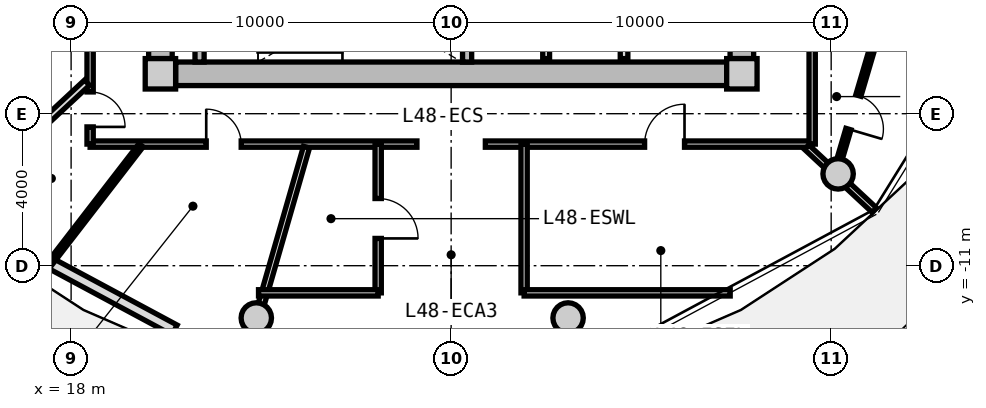
"""IFC4 building model, lengths in metres.
Left out: names, types, materials, properties, quantities, classifications, styles, units other than length and angle.
Written with IfcOpenShell. Run it as: python <this file> out.ifc"""

import sys

from ifc_helpers import new_model, si_unit, direction, frame, frame_2d, origin, origin_2d, place, context, subcontext, project, spatial, rectangle, circle, extrude, source, transform, mapped, element, fill, save


model = new_model("IFC4")
c1 = context("Model", 3, precision=1e-05, world=origin(), true_north=direction((0.0, 1.0)))
c2 = subcontext(c1, "Body", "Model", "MODEL_VIEW")
j1 = project(units=[si_unit("LENGTHUNIT", "METRE"), si_unit("PLANEANGLEUNIT", "RADIAN")], contexts=[c1])
p1 = place(None, origin())
s1 = spatial("IfcSite", under=j1, at=p1, CompositionType="ELEMENT")
p2 = place(p1, origin())
s2 = spatial("IfcBuilding", under=s1, at=p2, CompositionType="ELEMENT")
p3 = place(p2, frame((0.0, 0.0, 155.65)))
s3 = spatial("IfcBuildingStorey", under=s2, at=p3, CompositionType="ELEMENT", Elevation=155.65)
m1 = source(origin(), c2, "Body", "SweptSolid", [
    extrude(rectangle(XDim=0.8, YDim=0.8, at=origin_2d()), origin(), (0.0, 0.0, 1.0), 3.05),
])
for number, where, z_axis, x_axis in (
    (1, (20.35, -5.95, 0.0), (0.0, 0.0, 1.0), (1.0, 0.0, 0.0)),
    (2, (35.65, -5.95, 0.0), (0.0, 0.0, 1.0), (1.0, 0.0, 0.0)),
):
    element("IfcColumn", number, at=place(p3, frame(where, z_axis=z_axis, x_axis=x_axis)), inside=s3, PredefinedType="COLUMN", context=c2, shape_type="MappedRepresentation", body=[
        mapped(m1, transform((0.0, 0.0, 0.0), x_axis=(1.0, 0.0, 0.0), y_axis=(0.0, 1.0, 0.0), z_axis=(0.0, 0.0, 1.0), scale=1.0)),
    ])
m2 = source(origin(), c2, "Body", "SweptSolid", [
    extrude(rectangle(XDim=14.5, YDim=0.62, at=frame_2d((7.25, 0.0))), origin(), (0.0, 0.0, 1.0), 2.81),
])
p4 = place(p3, frame((35.25, -5.95, 0.0), z_axis=(0.0, 0.0, 1.0), x_axis=(-1.0, 0.0, 0.0)))
e3 = element("IfcWall", 3, at=p4, inside=s3, PredefinedType="SHEAR", context=c2, shape_type="MappedRepresentation", body=[
    mapped(m2, transform((0.0, 0.0, 0.0), x_axis=(1.0, 0.0, 0.0), y_axis=(0.0, 1.0, 0.0), z_axis=(0.0, 0.0, 1.0), scale=1.0)),
])
m3 = source(origin(), c2, "Body", "SweptSolid", [
    extrude(rectangle(XDim=11.1, YDim=0.62, at=frame_2d((5.55, 0.0))), origin(), (0.0, 0.0, 1.0), 2.81),
])
p5 = place(p3, frame((20.35, -5.55, 0.0), z_axis=(0.0, 0.0, 1.0), x_axis=(0.0, 1.0, 0.0)))
e4 = element("IfcWall", 4, at=p5, inside=s3, PredefinedType="SHEAR", context=c2, shape_type="MappedRepresentation", body=[
    mapped(m3, transform((0.0, 0.0, 0.0), x_axis=(1.0, 0.0, 0.0), y_axis=(0.0, 1.0, 0.0), z_axis=(0.0, 0.0, 1.0), scale=1.0)),
])
p6 = place(p5, frame((3.8, 0.0, 0.0)))
e5 = element("IfcOpeningElement", 5, at=p6, cuts=e4, PredefinedType="OPENING", context=c2, shape_type="SweptSolid", body=[
    extrude(rectangle(XDim=1.2, YDim=2.15, at=frame_2d((0.6, 1.075))), frame((0.0, 0.32, 0.0), z_axis=(0.0, -1.0, 0.0), x_axis=(1.0, 0.0, 0.0)), (0.0, 0.0, 1.0), 0.64),
])
p7 = place(p3, frame((35.65, 5.55, 0.0), z_axis=(0.0, 0.0, 1.0), x_axis=(0.0, -1.0, 0.0)))
e6 = element("IfcWall", 6, at=p7, inside=s3, PredefinedType="SHEAR", context=c2, shape_type="MappedRepresentation", body=[
    mapped(m3, transform((0.0, 0.0, 0.0), x_axis=(1.0, 0.0, 0.0), y_axis=(0.0, 1.0, 0.0), z_axis=(0.0, 0.0, 1.0), scale=1.0)),
])
p8 = place(p7, frame((5.65, 0.0, 0.0)))
e7 = element("IfcOpeningElement", 7, at=p8, cuts=e6, PredefinedType="OPENING", context=c2, shape_type="SweptSolid", body=[
    extrude(rectangle(XDim=1.2, YDim=2.15, at=frame_2d((0.6, 1.075))), frame((0.0, 0.32, 0.0), z_axis=(0.0, -1.0, 0.0), x_axis=(1.0, 0.0, 0.0)), (0.0, 0.0, 1.0), 0.64),
])
m4 = source(origin(), c2, "Body", "SweptSolid", [
    extrude(circle(Radius=0.4, at=origin_2d()), origin(), (0.0, 0.0, 1.0), 3.05),
])
for number, where, z_axis, x_axis in (
    (8, (22.873, -12.375, 0.0), (0.0, 0.0, 1.0), (1.0, 0.0, 0.0)),
    (9, (31.077, -12.375, 0.0), (0.0, 0.0, 1.0), (1.0, 0.0, 0.0)),
    (10, (38.183, -8.584, 0.0), (0.0, 0.0, 1.0), (1.0, 0.0, 0.0)),
):
    element("IfcColumn", number, at=place(p3, frame(where, z_axis=z_axis, x_axis=x_axis)), inside=s3, PredefinedType="COLUMN", context=c2, shape_type="MappedRepresentation", body=[
        mapped(m4, transform((0.0, 0.0, 0.0), x_axis=(1.0, 0.0, 0.0), y_axis=(0.0, 1.0, 0.0), z_axis=(0.0, 0.0, 1.0), scale=1.0)),
    ])
m5 = source(origin(), c2, "Body", "SweptSolid", [
    extrude(rectangle(XDim=8.742, YDim=0.29, at=frame_2d((4.371, 0.0))), origin(), (0.0, 0.0, 1.0), 2.81),
])
p9 = place(p3, frame((22.529, -13.66, 0.0), z_axis=(0.0, 0.0, 1.0), x_axis=(-0.880998740657, 0.473118609823, 0.0)))
e11 = element("IfcWall", 11, at=p9, inside=s3, PredefinedType="SOLIDWALL", context=c2, shape_type="MappedRepresentation", body=[
    mapped(m5, transform((0.0, 0.0, 0.0), x_axis=(1.0, 0.0, 0.0), y_axis=(0.0, 1.0, 0.0), z_axis=(0.0, 0.0, 1.0), scale=1.0)),
])
p10 = place(p9, frame((0.9, 0.0, 0.0)))
e12 = element("IfcOpeningElement", 12, at=p10, cuts=e11, PredefinedType="OPENING", context=c2, shape_type="SweptSolid", body=[
    extrude(rectangle(XDim=1.15, YDim=2.25, at=frame_2d((0.575, 1.125))), frame((0.0, 0.155, 0.0), z_axis=(0.0, -1.0, 0.0), x_axis=(1.0, 0.0, 0.0)), (0.0, 0.0, 1.0), 0.31),
])
p11 = place(p9, frame((6.161, 0.0, 0.85)))
e13 = element("IfcOpeningElement", 13, at=p11, cuts=e11, PredefinedType="OPENING", context=c2, shape_type="SweptSolid", body=[
    extrude(rectangle(XDim=1.2, YDim=1.5, at=frame_2d((0.6, 0.75))), frame((0.0, 0.155, 0.0), z_axis=(0.0, -1.0, 0.0), x_axis=(1.0, 0.0, 0.0)), (0.0, 0.0, 1.0), 0.31),
])
m6 = source(origin(), c2, "Body", "SweptSolid", [
    extrude(rectangle(XDim=3.19, YDim=0.24, at=frame_2d((1.595, 0.0))), origin(), (0.0, 0.0, 1.0), 2.81),
])
for number, where, z_axis, x_axis in (
    (14, (21.38, -5.64, 0.0), (0.0, 0.0, 1.0), (0.0, 1.0, 0.0)),
    (15, (28.42, -5.64, 0.0), (0.0, 0.0, 1.0), (0.0, 1.0, 0.0)),
):
    element("IfcWall", number, at=place(p3, frame(where, z_axis=z_axis, x_axis=x_axis)), inside=s3, PredefinedType="PARTITIONING", context=c2, shape_type="MappedRepresentation", body=[
        mapped(m6, transform((0.0, 0.0, 0.0), x_axis=(1.0, 0.0, 0.0), y_axis=(0.0, 1.0, 0.0), z_axis=(0.0, 0.0, 1.0), scale=1.0)),
    ])
m7 = source(origin(), c2, "Body", "SweptSolid", [
    extrude(rectangle(XDim=3.8, YDim=0.2, at=frame_2d((1.9, 0.0))), origin(), (0.0, 0.0, 1.0), 2.795),
])
p12 = place(p3, frame((32.55, -5.55, 0.0), z_axis=(0.0, 0.0, 1.0), x_axis=(0.0, 1.0, 0.0)))
e16 = element("IfcWall", 16, at=p12, inside=s3, PredefinedType="PARTITIONING", context=c2, shape_type="MappedRepresentation", body=[
    mapped(m7, transform((0.0, 0.0, 0.0), x_axis=(1.0, 0.0, 0.0), y_axis=(0.0, 1.0, 0.0), z_axis=(0.0, 0.0, 1.0), scale=1.0)),
])
m8 = source(origin(), c2, "Body", "SweptSolid", [
    extrude(rectangle(XDim=3.22, YDim=0.18, at=frame_2d((1.61, 0.0))), origin(), (0.0, 0.0, 1.0), 2.795),
])
p13 = place(p3, frame((30.5, -5.55, 0.0), z_axis=(0.0, 0.0, 1.0), x_axis=(0.0, 1.0, 0.0)))
e17 = element("IfcWall", 17, at=p13, inside=s3, PredefinedType="PARTITIONING", context=c2, shape_type="MappedRepresentation", body=[
    mapped(m8, transform((0.0, 0.0, 0.0), x_axis=(1.0, 0.0, 0.0), y_axis=(0.0, 1.0, 0.0), z_axis=(0.0, 0.0, 1.0), scale=1.0)),
])
m9 = source(origin(), c2, "Body", "SweptSolid", [
    extrude(rectangle(XDim=8.6, YDim=0.165, at=frame_2d((4.3, 0.0))), origin(), (0.0, 0.0, 1.0), 2.795),
])
p14 = place(p3, frame((37.5, -7.8, 0.0), z_axis=(0.0, 0.0, 1.0), x_axis=(-1.0, 0.0, 0.0)))
e18 = element("IfcWall", 18, at=p14, inside=s3, PredefinedType="PARTITIONING", context=c2, shape_type="MappedRepresentation", body=[
    mapped(m9, transform((0.0, 0.0, 0.0), x_axis=(1.0, 0.0, 0.0), y_axis=(0.0, 1.0, 0.0), z_axis=(0.0, 0.0, 1.0), scale=1.0)),
])
p15 = place(p14, frame((3.359, 0.0, 0.0)))
e19 = element("IfcOpeningElement", 19, at=p15, cuts=e18, PredefinedType="OPENING", context=c2, shape_type="SweptSolid", body=[
    extrude(rectangle(XDim=1.05, YDim=2.15, at=frame_2d((0.525, 1.075))), frame((0.0, 0.093, 0.0), z_axis=(0.0, -1.0, 0.0), x_axis=(1.0, 0.0, 0.0)), (0.0, 0.0, 1.0), 0.185),
])
p16 = place(p3, frame((27.1, -7.8, 0.0), z_axis=(0.0, 0.0, 1.0), x_axis=(-1.0, 0.0, 0.0)))
e20 = element("IfcWall", 20, at=p16, inside=s3, PredefinedType="PARTITIONING", context=c2, shape_type="MappedRepresentation", body=[
    mapped(m9, transform((0.0, 0.0, 0.0), x_axis=(1.0, 0.0, 0.0), y_axis=(0.0, 1.0, 0.0), z_axis=(0.0, 0.0, 1.0), scale=1.0)),
])
p17 = place(p16, frame((4.625, 0.0, 0.0)))
e21 = element("IfcOpeningElement", 21, at=p17, cuts=e20, PredefinedType="OPENING", context=c2, shape_type="SweptSolid", body=[
    extrude(rectangle(XDim=0.92, YDim=2.1, at=frame_2d((0.46, 1.05))), frame((0.0, 0.093, 0.0), z_axis=(0.0, -1.0, 0.0), x_axis=(1.0, 0.0, 0.0)), (0.0, 0.0, 1.0), 0.185),
])
m10 = source(origin(), c2, "Body", "SweptSolid", [
    extrude(rectangle(XDim=15.6, YDim=0.165, at=frame_2d((7.8, 0.0))), origin(), (0.0, 0.0, 1.0), 2.795),
])
p18 = place(p3, frame((18.5, -7.8, 0.0), z_axis=(0.0, 0.0, 1.0), x_axis=(0.0, 1.0, 0.0)))
e22 = element("IfcWall", 22, at=p18, inside=s3, PredefinedType="PARTITIONING", context=c2, shape_type="MappedRepresentation", body=[
    mapped(m10, transform((0.0, 0.0, 0.0), x_axis=(1.0, 0.0, 0.0), y_axis=(0.0, 1.0, 0.0), z_axis=(0.0, 0.0, 1.0), scale=1.0)),
])
p19 = place(p18, frame((12.591, 0.0, 0.0)))
e23 = element("IfcOpeningElement", 23, at=p19, cuts=e22, PredefinedType="OPENING", context=c2, shape_type="SweptSolid", body=[
    extrude(rectangle(XDim=1.05, YDim=2.15, at=frame_2d((0.525, 1.075))), frame((0.0, 0.093, 0.0), z_axis=(0.0, -1.0, 0.0), x_axis=(1.0, 0.0, 0.0)), (0.0, 0.0, 1.0), 0.185),
])
p20 = place(p18, frame((8.081, 0.0, 0.0)))
e24 = element("IfcOpeningElement", 24, at=p20, cuts=e22, PredefinedType="OPENING", context=c2, shape_type="SweptSolid", body=[
    extrude(rectangle(XDim=1.05, YDim=2.15, at=frame_2d((0.525, 1.075))), frame((0.0, 0.093, 0.0), z_axis=(0.0, -1.0, 0.0), x_axis=(1.0, 0.0, 0.0)), (0.0, 0.0, 1.0), 0.185),
])
p21 = place(p18, frame((2.854, 0.0, 0.0)))
e25 = element("IfcOpeningElement", 25, at=p21, cuts=e22, PredefinedType="OPENING", context=c2, shape_type="SweptSolid", body=[
    extrude(rectangle(XDim=1.05, YDim=2.15, at=frame_2d((0.525, 1.075))), frame((0.0, 0.093, 0.0), z_axis=(0.0, -1.0, 0.0), x_axis=(1.0, 0.0, 0.0)), (0.0, 0.0, 1.0), 0.185),
])
p22 = place(p18, frame((0.452, 0.0, 0.0)))
e26 = element("IfcOpeningElement", 26, at=p22, cuts=e22, PredefinedType="OPENING", context=c2, shape_type="SweptSolid", body=[
    extrude(rectangle(XDim=0.92, YDim=2.1, at=frame_2d((0.46, 1.05))), frame((0.0, 0.093, 0.0), z_axis=(0.0, -1.0, 0.0), x_axis=(1.0, 0.0, 0.0)), (0.0, 0.0, 1.0), 0.185),
])
p23 = place(p3, frame((37.5, 7.8, 0.0), z_axis=(0.0, 0.0, 1.0), x_axis=(0.0, -1.0, 0.0)))
e27 = element("IfcWall", 27, at=p23, inside=s3, PredefinedType="PARTITIONING", context=c2, shape_type="MappedRepresentation", body=[
    mapped(m10, transform((0.0, 0.0, 0.0), x_axis=(1.0, 0.0, 0.0), y_axis=(0.0, 1.0, 0.0), z_axis=(0.0, 0.0, 1.0), scale=1.0)),
])
p24 = place(p23, frame((9.896, 0.0, 0.0)))
e28 = element("IfcOpeningElement", 28, at=p24, cuts=e27, PredefinedType="OPENING", context=c2, shape_type="SweptSolid", body=[
    extrude(rectangle(XDim=1.05, YDim=2.15, at=frame_2d((0.525, 1.075))), frame((0.0, 0.093, 0.0), z_axis=(0.0, -1.0, 0.0), x_axis=(1.0, 0.0, 0.0)), (0.0, 0.0, 1.0), 0.185),
])
p25 = place(p23, frame((4.306, 0.0, 0.0)))
e29 = element("IfcOpeningElement", 29, at=p25, cuts=e27, PredefinedType="OPENING", context=c2, shape_type="SweptSolid", body=[
    extrude(rectangle(XDim=1.05, YDim=2.15, at=frame_2d((0.525, 1.075))), frame((0.0, 0.093, 0.0), z_axis=(0.0, -1.0, 0.0), x_axis=(1.0, 0.0, 0.0)), (0.0, 0.0, 1.0), 0.185),
])
m11 = source(origin(), c2, "Body", "SweptSolid", [
    extrude(rectangle(XDim=6.035, YDim=0.165, at=frame_2d((3.018, 0.0))), origin(), (0.0, 0.0, 1.0), 2.345),
])
p26 = place(p3, frame((24.194, -7.88, 0.0), z_axis=(0.0, 0.0, 1.0), x_axis=(-0.276809454862, -0.960924828329, 0.0)))
e30 = element("IfcWall", 30, at=p26, inside=s3, PredefinedType="PARTITIONING", context=c2, shape_type="MappedRepresentation", body=[
    mapped(m11, transform((0.0, 0.0, 0.0), x_axis=(1.0, 0.0, 0.0), y_axis=(0.0, 1.0, 0.0), z_axis=(0.0, 0.0, 1.0), scale=1.0)),
])
m12 = source(origin(), c2, "Body", "SweptSolid", [
    extrude(rectangle(XDim=2.435, YDim=0.165, at=frame_2d((1.217, 0.0))), origin(), (0.0, 0.0, 1.0), 2.345),
])
p27 = place(p3, frame((37.354, -7.88, 0.0), z_axis=(0.0, 0.0, 1.0), x_axis=(0.732164643118, -0.681127693878, 0.0)))
e31 = element("IfcWall", 31, at=p27, inside=s3, PredefinedType="PARTITIONING", context=c2, shape_type="MappedRepresentation", body=[
    mapped(m12, transform((0.0, 0.0, 0.0), x_axis=(1.0, 0.0, 0.0), y_axis=(0.0, 1.0, 0.0), z_axis=(0.0, 0.0, 1.0), scale=1.0)),
])
m13 = source(origin(), c2, "Body", "SweptSolid", [
    extrude(rectangle(XDim=3.915, YDim=0.165, at=frame_2d((1.957, 0.0))), origin(), (0.0, 0.0, 1.0), 2.795),
])
p28 = place(p3, frame((26.08, -11.715, 0.0), z_axis=(0.0, 0.0, 1.0), x_axis=(0.0, 1.0, 0.0)))
e32 = element("IfcWall", 32, at=p28, inside=s3, PredefinedType="PARTITIONING", context=c2, shape_type="MappedRepresentation", body=[
    mapped(m13, transform((0.0, 0.0, 0.0), x_axis=(1.0, 0.0, 0.0), y_axis=(0.0, 1.0, 0.0), z_axis=(0.0, 0.0, 1.0), scale=1.0)),
])
p29 = place(p28, frame((1.432, 0.0, 0.0)))
e33 = element("IfcOpeningElement", 33, at=p29, cuts=e32, PredefinedType="OPENING", context=c2, shape_type="SweptSolid", body=[
    extrude(rectangle(XDim=1.05, YDim=2.15, at=frame_2d((0.525, 1.075))), frame((0.0, 0.093, 0.0), z_axis=(0.0, -1.0, 0.0), x_axis=(1.0, 0.0, 0.0)), (0.0, 0.0, 1.0), 0.185),
])
m14 = source(origin(), c2, "Body", "SweptSolid", [
    extrude(rectangle(XDim=3.149, YDim=0.165, at=frame_2d((1.574, 0.0))), origin(), (0.0, 0.0, 1.0), 2.795),
])
p30 = place(p3, frame((22.931, -11.715, 0.0), z_axis=(0.0, 0.0, 1.0), x_axis=(1.0, 0.0, 0.0)))
e34 = element("IfcWall", 34, at=p30, inside=s3, PredefinedType="PARTITIONING", context=c2, shape_type="MappedRepresentation", body=[
    mapped(m14, transform((0.0, 0.0, 0.0), x_axis=(1.0, 0.0, 0.0), y_axis=(0.0, 1.0, 0.0), z_axis=(0.0, 0.0, 1.0), scale=1.0)),
])
m15 = source(origin(), c2, "Body", "SweptSolid", [
    extrude(rectangle(XDim=3.915, YDim=0.165, at=frame_2d((1.957, 0.0))), origin(), (0.0, 0.0, 1.0), 2.435),
])
p31 = place(p3, frame((29.92, -11.715, 0.0), z_axis=(0.0, 0.0, 1.0), x_axis=(0.0, 1.0, 0.0)))
e35 = element("IfcWall", 35, at=p31, inside=s3, PredefinedType="PARTITIONING", context=c2, shape_type="MappedRepresentation", body=[
    mapped(m15, transform((0.0, 0.0, 0.0), x_axis=(1.0, 0.0, 0.0), y_axis=(0.0, 1.0, 0.0), z_axis=(0.0, 0.0, 1.0), scale=1.0)),
])
m16 = source(origin(), c2, "Body", "SweptSolid", [
    extrude(rectangle(XDim=5.423, YDim=0.165, at=frame_2d((2.712, 0.0))), origin(), (0.0, 0.0, 1.0), 2.795),
])
p32 = place(p3, frame((29.92, -11.715, 0.0), z_axis=(0.0, 0.0, 1.0), x_axis=(1.0, 0.0, 0.0)))
e36 = element("IfcWall", 36, at=p32, inside=s3, PredefinedType="PARTITIONING", context=c2, shape_type="MappedRepresentation", body=[
    mapped(m16, transform((0.0, 0.0, 0.0), x_axis=(1.0, 0.0, 0.0), y_axis=(0.0, 1.0, 0.0), z_axis=(0.0, 0.0, 1.0), scale=1.0)),
])
m17 = source(origin(), c2, "Body", "SweptSolid", [
    extrude(rectangle(XDim=4.927, YDim=0.19, at=frame_2d((2.463, 0.0))), origin(), (0.0, 0.0, 1.0), 2.345),
])
p33 = place(p3, frame((18.42, -6.183, 0.0), z_axis=(0.0, 0.0, 1.0), x_axis=(-0.732191335987, -0.681098999783, 0.0)))
e37 = element("IfcWall", 37, at=p33, inside=s3, PredefinedType="PARTITIONING", context=c2, shape_type="MappedRepresentation", body=[
    mapped(m17, transform((0.0, 0.0, 0.0), x_axis=(1.0, 0.0, 0.0), y_axis=(0.0, 1.0, 0.0), z_axis=(0.0, 0.0, 1.0), scale=1.0)),
])
m18 = source(origin(), c2, "Body", "SweptSolid", [
    extrude(rectangle(XDim=3.937, YDim=0.14, at=frame_2d((1.968, 0.0))), origin(), (0.0, 0.0, 1.0), 2.795),
])
p34 = place(p3, frame((19.84, -7.83, 0.0), z_axis=(0.0, 0.0, 1.0), x_axis=(-0.611055586441, -0.79158768957, 0.0)))
e38 = element("IfcWall", 38, at=p34, inside=s3, PredefinedType="PARTITIONING", context=c2, shape_type="MappedRepresentation", body=[
    mapped(m18, transform((0.0, 0.0, 0.0), x_axis=(1.0, 0.0, 0.0), y_axis=(0.0, 1.0, 0.0), z_axis=(0.0, 0.0, 1.0), scale=1.0)),
])
m19 = source(origin(), c2, "Body", "SweptSolid", [
    extrude(rectangle(XDim=3.47, YDim=0.14, at=frame_2d((1.735, 0.0))), origin(), (0.0, 0.0, 1.0), 2.795),
])
p35 = place(p3, frame((39.076, -5.3, 0.0), z_axis=(0.0, 0.0, 1.0), x_axis=(-0.283194656898, -0.959062451723, 0.0)))
e39 = element("IfcWall", 39, at=p35, inside=s3, PredefinedType="PARTITIONING", context=c2, shape_type="MappedRepresentation", body=[
    mapped(m19, transform((0.0, 0.0, 0.0), x_axis=(1.0, 0.0, 0.0), y_axis=(0.0, 1.0, 0.0), z_axis=(0.0, 0.0, 1.0), scale=1.0)),
])
p36 = place(p35, frame((1.275, 0.0, 0.0)))
e40 = element("IfcOpeningElement", 40, at=p36, cuts=e39, PredefinedType="OPENING", context=c2, shape_type="SweptSolid", body=[
    extrude(rectangle(XDim=0.92, YDim=2.1, at=frame_2d((0.46, 1.05))), frame((0.0, 0.08, 0.0), z_axis=(0.0, -1.0, 0.0), x_axis=(1.0, 0.0, 0.0)), (0.0, 0.0, 1.0), 0.16),
])
m20 = source(origin(), c2, "Body", "SweptSolid", [
    extrude(rectangle(XDim=1.05, YDim=2.15, at=frame_2d((0.525, 1.075))), frame((0.0, 0.025, 0.0), z_axis=(0.0, -1.0, 0.0), x_axis=(1.0, 0.0, 0.0)), (0.0, 0.0, 1.0), 0.05),
])
p37 = place(p29, frame((1.05, 0.0, 0.0), z_axis=(0.0, 0.0, 1.0), x_axis=(-1.0, 0.0, 0.0)))
e41 = element("IfcDoor", 41, at=p37, inside=s3, OperationType="SINGLE_SWING_RIGHT", PredefinedType="DOOR", context=c2, shape_type="MappedRepresentation", body=[
    mapped(m20, transform((0.0, 0.0, 0.0), x_axis=(1.0, 0.0, 0.0), y_axis=(0.0, 1.0, 0.0), z_axis=(0.0, 0.0, 1.0), scale=1.0)),
])
fill(e33, e41)
p38 = place(p15, frame((1.05, 0.0, 0.0), z_axis=(0.0, 0.0, 1.0), x_axis=(-1.0, 0.0, 0.0)))
e42 = element("IfcDoor", 42, at=p38, inside=s3, OperationType="SINGLE_SWING_RIGHT", PredefinedType="DOOR", context=c2, shape_type="MappedRepresentation", body=[
    mapped(m20, transform((0.0, 0.0, 0.0), x_axis=(1.0, 0.0, 0.0), y_axis=(0.0, 1.0, 0.0), z_axis=(0.0, 0.0, 1.0), scale=1.0)),
])
fill(e19, e42)
m21 = source(origin(), c2, "Body", "SweptSolid", [
    extrude(rectangle(XDim=0.92, YDim=2.1, at=frame_2d((0.46, 1.05))), frame((0.0, 0.025, 0.0), z_axis=(0.0, -1.0, 0.0), x_axis=(1.0, 0.0, 0.0)), (0.0, 0.0, 1.0), 0.05),
])
p39 = place(p22, frame((0.92, 0.0, 0.0), z_axis=(0.0, 0.0, 1.0), x_axis=(-1.0, 0.0, 0.0)))
e43 = element("IfcDoor", 43, at=p39, inside=s3, OperationType="SINGLE_SWING_RIGHT", PredefinedType="DOOR", context=c2, shape_type="MappedRepresentation", body=[
    mapped(m21, transform((0.0, 0.0, 0.0), x_axis=(1.0, 0.0, 0.0), y_axis=(0.0, 1.0, 0.0), z_axis=(0.0, 0.0, 1.0), scale=1.0)),
])
fill(e26, e43)
p40 = place(p17, frame((0.92, 0.0, 0.0), z_axis=(0.0, 0.0, 1.0), x_axis=(-1.0, 0.0, 0.0)))
e44 = element("IfcDoor", 44, at=p40, inside=s3, OperationType="SINGLE_SWING_LEFT", PredefinedType="DOOR", context=c2, shape_type="MappedRepresentation", body=[
    mapped(m21, transform((0.0, 0.0, 0.0), x_axis=(1.0, 0.0, 0.0), y_axis=(0.0, 1.0, 0.0), z_axis=(0.0, 0.0, 1.0), scale=1.0)),
])
fill(e21, e44)
p41 = place(p36, origin())
e45 = element("IfcDoor", 45, at=p41, inside=s3, OperationType="SINGLE_SWING_RIGHT", PredefinedType="DOOR", context=c2, shape_type="MappedRepresentation", body=[
    mapped(m21, transform((0.0, 0.0, 0.0), x_axis=(1.0, 0.0, 0.0), y_axis=(0.0, 1.0, 0.0), z_axis=(0.0, 0.0, 1.0), scale=1.0)),
])
fill(e40, e45)
save(model, sys.argv[1])
